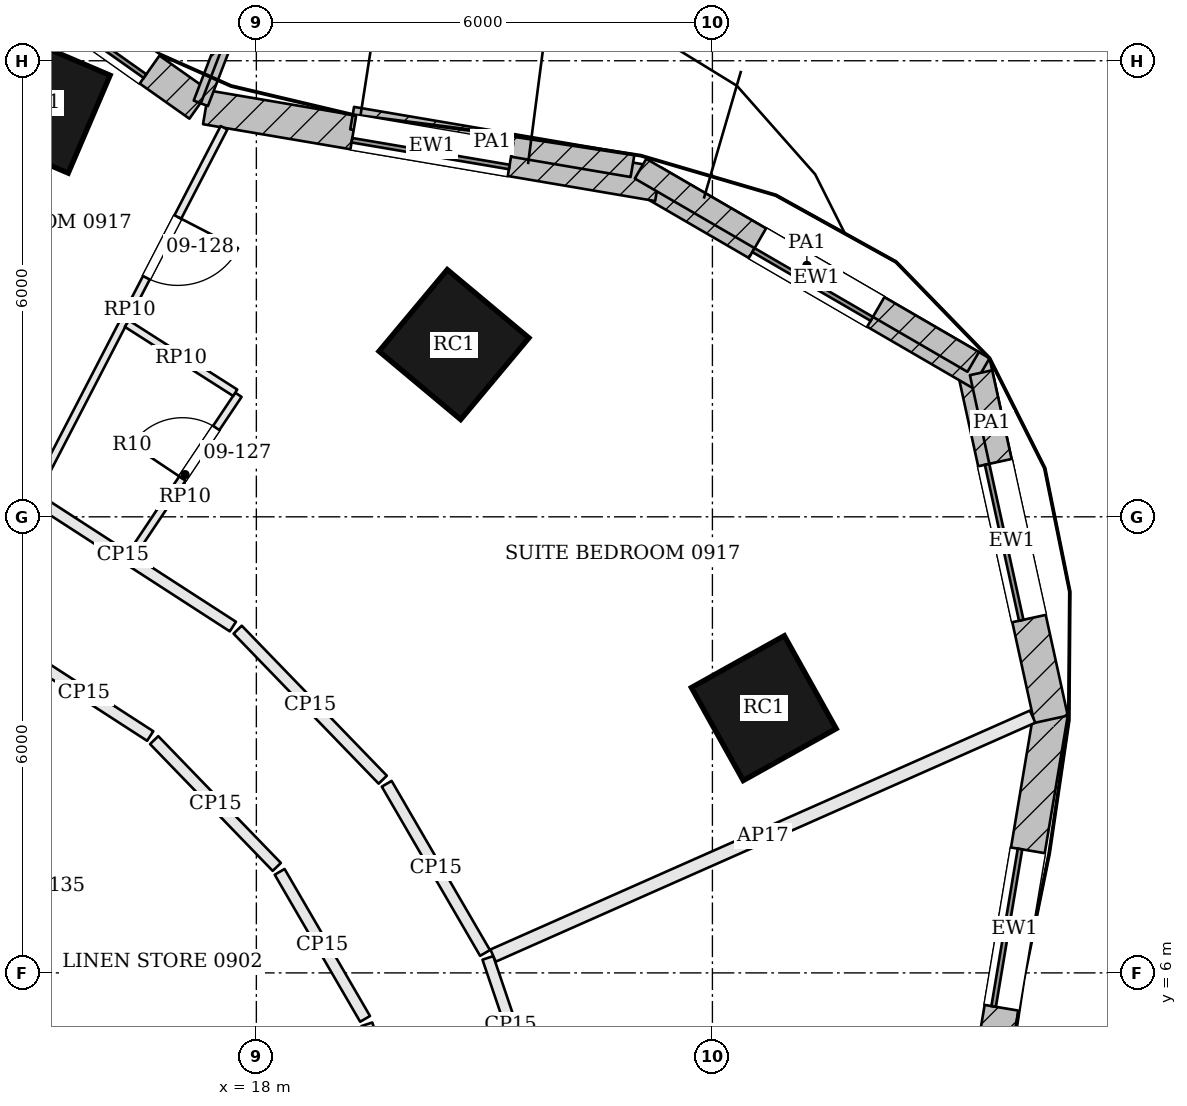
"""IFC4 building model, lengths in metres.
Left out: names, types, materials, properties, quantities, classifications, styles, units other than length and angle.
Written with IfcOpenShell. Run it as: python <this file> out.ifc"""

import sys

from ifc_helpers import new_model, si_unit, direction, frame, frame_2d, origin, origin_2d, place, context, subcontext, project, spatial, rectangle, extrude, element, fill, save


model = new_model("IFC4")
c1 = context("Model", 3, precision=1e-05, world=origin(), true_north=direction((0.0, 1.0)))
c2 = subcontext(c1, "Body", "Model", "MODEL_VIEW")
j1 = project(units=[si_unit("LENGTHUNIT", "METRE"), si_unit("PLANEANGLEUNIT", "RADIAN")], contexts=[c1])
p1 = place(None, origin())
s1 = spatial("IfcSite", under=j1, at=p1, CompositionType="ELEMENT")
p2 = place(p1, origin())
s2 = spatial("IfcBuilding", under=s1, at=p2, CompositionType="ELEMENT")
p3 = place(p2, frame((0.0, 0.0, 48.3)))
s3 = spatial("IfcBuildingStorey", under=s2, at=p3, CompositionType="ELEMENT", Elevation=48.3)
for number, where, z_axis, x_axis in (
    (1, (24.676, 9.483, 0.0), (0.0, 0.0, 1.0), (-0.487, 0.873, 0.0)),
    (2, (20.6, 14.266, 0.0), (0.0, 0.0, 1.0), (-0.767, 0.641, 0.0)),
    (3, (15.157, 17.441, 0.0), (0.0, 0.0, 1.0), (-0.919, 0.394, 0.0)),
):
    element("IfcColumn", number, at=place(p3, frame(where, z_axis=z_axis, x_axis=x_axis)), inside=s3, PredefinedType="COLUMN", context=c2, shape_type="SweptSolid", body=[
        extrude(rectangle(XDim=1.4, YDim=1.4, at=origin_2d()), origin(), (0.0, 0.0, 1.0), 3.6),
    ])
p4 = place(p3, frame((27.5, 3.732, 0.0), z_axis=(0.0, 0.0, 1.0), x_axis=(0.165174419367, 0.986264371853, 0.0)))
e4 = element("IfcWall", 4, at=p4, inside=s3, PredefinedType="SOLIDWALL", context=c2, shape_type="SweptSolid", body=[
    extrude(rectangle(XDim=5.769, YDim=0.45, at=frame_2d((2.885, 0.0))), origin(), (0.0, 0.0, 1.0), 3.4),
])
p5 = place(p4, frame((1.834, 0.0, 0.9)))
e5 = element("IfcOpeningElement", 5, at=p5, cuts=e4, PredefinedType="OPENING", context=c2, shape_type="SweptSolid", body=[
    extrude(rectangle(XDim=2.1, YDim=2.0, at=frame_2d((1.05, 1.0))), frame((0.0, 0.235, 0.0), z_axis=(0.0, -1.0, 0.0), x_axis=(1.0, 0.0, 0.0)), (0.0, 0.0, 1.0), 0.47),
])
p6 = place(p3, frame((28.456, 9.337, 0.0), z_axis=(0.0, 0.0, 1.0), x_axis=(-0.213878425795, 0.976860286315, 0.0)))
e6 = element("IfcWall", 6, at=p6, inside=s3, PredefinedType="SOLIDWALL", context=c2, shape_type="SweptSolid", body=[
    extrude(rectangle(XDim=4.812, YDim=0.45, at=frame_2d((2.406, 0.0))), origin(), (0.0, 0.0, 1.0), 3.4),
])
p7 = place(p6, frame((1.356, 0.0, 0.9)))
e7 = element("IfcOpeningElement", 7, at=p7, cuts=e6, PredefinedType="OPENING", context=c2, shape_type="SweptSolid", body=[
    extrude(rectangle(XDim=2.1, YDim=2.0, at=frame_2d((1.05, 1.0))), frame((0.0, 0.235, 0.0), z_axis=(0.0, -1.0, 0.0), x_axis=(1.0, 0.0, 0.0)), (0.0, 0.0, 1.0), 0.47),
])
p8 = place(p3, frame((27.533, 13.891, 0.0), z_axis=(0.0, 0.0, 1.0), x_axis=(-0.864657614938, 0.502361631625, 0.0)))
e8 = element("IfcWall", 8, at=p8, inside=s3, PredefinedType="SOLIDWALL", context=c2, shape_type="SweptSolid", body=[
    extrude(rectangle(XDim=5.001, YDim=0.45, at=frame_2d((2.5, 0.0))), origin(), (0.0, 0.0, 1.0), 3.4),
])
p9 = place(p8, frame((1.6, 0.0, 0.9)))
e9 = element("IfcOpeningElement", 9, at=p9, cuts=e8, PredefinedType="OPENING", context=c2, shape_type="SweptSolid", body=[
    extrude(rectangle(XDim=1.8, YDim=2.0, at=frame_2d((0.9, 1.0))), frame((0.0, 0.235, 0.0), z_axis=(0.0, -1.0, 0.0), x_axis=(1.0, 0.0, 0.0)), (0.0, 0.0, 1.0), 0.47),
])
p10 = place(p3, frame((23.284, 16.376, 0.0), z_axis=(0.0, 0.0, 1.0), x_axis=(-0.985861729428, 0.167560885797, 0.0)))
e10 = element("IfcWall", 10, at=p10, inside=s3, PredefinedType="SOLIDWALL", context=c2, shape_type="SweptSolid", body=[
    extrude(rectangle(XDim=6.033, YDim=0.45, at=frame_2d((3.017, 0.0))), origin(), (0.0, 0.0, 1.0), 3.4),
])
p11 = place(p10, frame((1.967, 0.0, 0.9)))
e11 = element("IfcOpeningElement", 11, at=p11, cuts=e10, PredefinedType="OPENING", context=c2, shape_type="SweptSolid", body=[
    extrude(rectangle(XDim=2.1, YDim=2.0, at=frame_2d((1.05, 1.0))), frame((0.0, 0.235, 0.0), z_axis=(0.0, -1.0, 0.0), x_axis=(1.0, 0.0, 0.0)), (0.0, 0.0, 1.0), 0.47),
])
p12 = place(p3, frame((17.249, 17.422, 0.0), z_axis=(0.0, 0.0, 1.0), x_axis=(-0.816589291225, 0.577219134694, 0.0)))
e12 = element("IfcWall", 12, at=p12, inside=s3, PredefinedType="SOLIDWALL", context=c2, shape_type="SweptSolid", body=[
    extrude(rectangle(XDim=3.701, YDim=0.45, at=frame_2d((1.851, 0.0))), origin(), (0.0, 0.0, 1.0), 3.4),
])
p13 = place(p12, frame((0.801, 0.0, 0.9)))
e13 = element("IfcOpeningElement", 13, at=p13, cuts=e12, PredefinedType="OPENING", context=c2, shape_type="SweptSolid", body=[
    extrude(rectangle(XDim=2.1, YDim=2.0, at=frame_2d((1.05, 1.0))), frame((0.0, 0.235, 0.0), z_axis=(0.0, -1.0, 0.0), x_axis=(1.0, 0.0, 0.0)), (0.0, 0.0, 1.0), 0.47),
])
p14 = place(p3, frame((17.269, 17.44, 0.0), z_axis=(0.0, 0.0, 1.0), x_axis=(0.359381039836, 0.933190906624, 0.0)))
e14 = element("IfcWall", 14, at=p14, inside=s3, PredefinedType="SOLIDWALL", context=c2, shape_type="SweptSolid", body=[
    extrude(rectangle(XDim=1.75, YDim=0.2, at=frame_2d((0.875, 0.0))), origin(), (0.0, 0.0, 1.0), 3.4),
])
p15 = place(p3, frame((27.823, 12.577, 3.6), z_axis=(0.0, 0.0, 1.0), x_axis=(-0.213826357694, 0.976871684898, 0.0)))
e15 = element("IfcWall", 15, at=p15, inside=s3, PredefinedType="PARAPET", context=c2, shape_type="SweptSolid", body=[
    extrude(rectangle(XDim=1.35, YDim=0.3, at=frame_2d((0.675, 0.0))), origin(), (0.0, 0.0, 1.0), 1.1),
])
p16 = place(p3, frame((27.431, 14.038, 3.6), z_axis=(0.0, 0.0, 1.0), x_axis=(-0.864664590165, 0.502349625773, 0.0)))
e16 = element("IfcWall", 16, at=p16, inside=s3, PredefinedType="PARAPET", context=c2, shape_type="SweptSolid", body=[
    extrude(rectangle(XDim=5.061, YDim=0.3, at=frame_2d((2.531, 0.0))), origin(), (0.0, 0.0, 1.0), 1.1),
])
p17 = place(p3, frame((22.949, 16.618, 3.6), z_axis=(0.0, 0.0, 1.0), x_axis=(-0.985859727788, 0.167572662229, 0.0)))
e17 = element("IfcWall", 17, at=p17, inside=s3, PredefinedType="PARAPET", context=c2, shape_type="SweptSolid", body=[
    extrude(rectangle(XDim=3.741, YDim=0.3, at=frame_2d((1.871, 0.0))), origin(), (0.0, 0.0, 1.0), 1.1),
])
p18 = place(p3, frame((21.644, 4.43, 0.0), z_axis=(0.0, 0.0, 1.0), x_axis=(-0.320738869387, 0.9471676608, 0.0)))
e18 = element("IfcWall", 18, at=p18, inside=s3, PredefinedType="PARTITIONING", context=c2, shape_type="SweptSolid", body=[
    extrude(rectangle(XDim=1.866, YDim=0.15, at=frame_2d((0.933, 0.0))), origin(), (0.0, 0.0, 1.0), 2.68),
])
p19 = place(p3, frame((28.213, 9.371, 0.0), z_axis=(0.0, 0.0, 1.0), x_axis=(-0.914345064768, -0.404935923986, 0.0)))
e19 = element("IfcWall", 19, at=p19, inside=s3, PredefinedType="PARTITIONING", context=c2, shape_type="SweptSolid", body=[
    extrude(rectangle(XDim=7.763, YDim=0.175, at=frame_2d((3.882, 0.0))), origin(), (0.0, 0.0, 1.0), 2.68),
])
p20 = place(p3, frame((21.008, 6.262, 0.0), z_axis=(0.0, 0.0, 1.0), x_axis=(-0.502366583903, 0.864654737671, 0.0)))
e20 = element("IfcWall", 20, at=p20, inside=s3, PredefinedType="PARTITIONING", context=c2, shape_type="SweptSolid", body=[
    extrude(rectangle(XDim=2.574, YDim=0.15, at=frame_2d((1.287, 0.0))), origin(), (0.0, 0.0, 1.0), 2.68),
])
p21 = place(p3, frame((19.663, 8.542, 0.0), z_axis=(0.0, 0.0, 1.0), x_axis=(-0.695225869021, 0.718791340407, 0.0)))
e21 = element("IfcWall", 21, at=p21, inside=s3, PredefinedType="PARTITIONING", context=c2, shape_type="SweptSolid", body=[
    extrude(rectangle(XDim=2.745, YDim=0.15, at=frame_2d((1.373, 0.0))), origin(), (0.0, 0.0, 1.0), 2.68),
])
p22 = place(p3, frame((17.691, 10.556, 0.0), z_axis=(0.0, 0.0, 1.0), x_axis=(-0.839564450265, 0.54326009779, 0.0)))
e22 = element("IfcWall", 22, at=p22, inside=s3, PredefinedType="PARTITIONING", context=c2, shape_type="SweptSolid", body=[
    extrude(rectangle(XDim=3.443, YDim=0.15, at=frame_2d((1.722, 0.0))), origin(), (0.0, 0.0, 1.0), 2.68),
])
p23 = place(p3, frame((14.863, 10.242, 0.0), z_axis=(0.0, 0.0, 1.0), x_axis=(0.839563837869, -0.543261044198, 0.0)))
e23 = element("IfcWall", 23, at=p23, inside=s3, PredefinedType="PARTITIONING", context=c2, shape_type="SweptSolid", body=[
    extrude(rectangle(XDim=2.073, YDim=0.15, at=frame_2d((1.037, 0.0))), origin(), (0.0, 0.0, 1.0), 2.68),
])
p24 = place(p3, frame((16.656, 9.062, 0.0), z_axis=(0.0, 0.0, 1.0), x_axis=(0.695225115827, -0.718792068906, 0.0)))
e24 = element("IfcWall", 24, at=p24, inside=s3, PredefinedType="PARTITIONING", context=c2, shape_type="SweptSolid", body=[
    extrude(rectangle(XDim=2.321, YDim=0.15, at=frame_2d((1.16, 0.0))), origin(), (0.0, 0.0, 1.0), 2.68),
])
p25 = place(p3, frame((18.306, 7.329, 0.0), z_axis=(0.0, 0.0, 1.0), x_axis=(0.502425081691, -0.864620747662, 0.0)))
e25 = element("IfcWall", 25, at=p25, inside=s3, PredefinedType="PARTITIONING", context=c2, shape_type="SweptSolid", body=[
    extrude(rectangle(XDim=2.237, YDim=0.15, at=frame_2d((1.119, 0.0))), origin(), (0.0, 0.0, 1.0), 2.68),
])
p26 = place(p3, frame((19.454, 5.324, 0.0), z_axis=(0.0, 0.0, 1.0), x_axis=(0.313632756375, -0.949544361327, 0.0)))
e26 = element("IfcWall", 26, at=p26, inside=s3, PredefinedType="PARTITIONING", context=c2, shape_type="SweptSolid", body=[
    extrude(rectangle(XDim=1.44, YDim=0.15, at=frame_2d((0.72, 0.0))), origin(), (0.0, 0.0, 1.0), 2.68),
])
p27 = place(p3, frame((17.575, 17.118, 0.0), z_axis=(0.0, 0.0, 1.0), x_axis=(-0.459763790059, -0.88804124755, 0.0)))
e27 = element("IfcWall", 27, at=p27, inside=s3, PredefinedType="PARTITIONING", context=c2, shape_type="SweptSolid", body=[
    extrude(rectangle(XDim=5.397, YDim=0.1, at=frame_2d((2.698, 0.0))), origin(), (0.0, 0.0, 1.0), 2.934),
])
p28 = place(p27, frame((1.322, 0.0, 0.0)))
e28 = element("IfcOpeningElement", 28, at=p28, cuts=e27, PredefinedType="OPENING", context=c2, shape_type="SweptSolid", body=[
    extrude(rectangle(XDim=0.9, YDim=2.4, at=frame_2d((0.45, 1.2))), frame((0.0, 0.06, 0.0), z_axis=(0.0, -1.0, 0.0), x_axis=(1.0, 0.0, 0.0)), (0.0, 0.0, 1.0), 0.12),
])
p29 = place(p3, frame((16.36, 11.507, 0.0), z_axis=(0.0, 0.0, 1.0), x_axis=(0.556060542822, 0.831141788576, 0.0)))
e29 = element("IfcWall", 29, at=p29, inside=s3, PredefinedType="PARTITIONING", context=c2, shape_type="SweptSolid", body=[
    extrude(rectangle(XDim=2.525, YDim=0.1, at=frame_2d((1.262, 0.0))), origin(), (0.0, 0.0, 1.0), 2.934),
])
p30 = place(p29, frame((1.2, 0.0, 0.0)))
e30 = element("IfcOpeningElement", 30, at=p30, cuts=e29, PredefinedType="OPENING", context=c2, shape_type="SweptSolid", body=[
    extrude(rectangle(XDim=0.8, YDim=2.1, at=frame_2d((0.4, 1.05))), frame((0.0, 0.06, 0.0), z_axis=(0.0, -1.0, 0.0), x_axis=(1.0, 0.0, 0.0)), (0.0, 0.0, 1.0), 0.12),
])
p31 = place(p3, frame((17.722, 13.632, 0.0), z_axis=(0.0, 0.0, 1.0), x_axis=(-0.843078245163, 0.537790918977, 0.0)))
e31 = element("IfcWall", 31, at=p31, inside=s3, PredefinedType="PARTITIONING", context=c2, shape_type="SweptSolid", body=[
    extrude(rectangle(XDim=1.691, YDim=0.1, at=frame_2d((0.845, 0.0))), origin(), (0.0, 0.0, 1.0), 2.934),
])
p32 = place(p5, origin())
e32 = element("IfcWindow", 32, at=p32, inside=s3, PartitioningType="SINGLE_PANEL", PredefinedType="WINDOW", context=c2, shape_type="SweptSolid", body=[
    extrude(rectangle(XDim=2.1, YDim=2.0, at=frame_2d((1.05, 1.0))), frame((0.0, 0.135, 0.0), z_axis=(0.0, -1.0, 0.0), x_axis=(1.0, 0.0, 0.0)), (0.0, 0.0, 1.0), 0.06),
])
fill(e5, e32)
p33 = place(p7, origin())
e33 = element("IfcWindow", 33, at=p33, inside=s3, PartitioningType="SINGLE_PANEL", PredefinedType="WINDOW", context=c2, shape_type="SweptSolid", body=[
    extrude(rectangle(XDim=2.1, YDim=2.0, at=frame_2d((1.05, 1.0))), frame((0.0, 0.135, 0.0), z_axis=(0.0, -1.0, 0.0), x_axis=(1.0, 0.0, 0.0)), (0.0, 0.0, 1.0), 0.06),
])
fill(e7, e33)
p34 = place(p9, origin())
e34 = element("IfcWindow", 34, at=p34, inside=s3, PartitioningType="SINGLE_PANEL", PredefinedType="WINDOW", context=c2, shape_type="SweptSolid", body=[
    extrude(rectangle(XDim=1.8, YDim=2.0, at=frame_2d((0.9, 1.0))), frame((0.0, 0.135, 0.0), z_axis=(0.0, -1.0, 0.0), x_axis=(1.0, 0.0, 0.0)), (0.0, 0.0, 1.0), 0.06),
])
fill(e9, e34)
p35 = place(p11, origin())
e35 = element("IfcWindow", 35, at=p35, inside=s3, PartitioningType="SINGLE_PANEL", PredefinedType="WINDOW", context=c2, shape_type="SweptSolid", body=[
    extrude(rectangle(XDim=2.1, YDim=2.0, at=frame_2d((1.05, 1.0))), frame((0.0, 0.135, 0.0), z_axis=(0.0, -1.0, 0.0), x_axis=(1.0, 0.0, 0.0)), (0.0, 0.0, 1.0), 0.06),
])
fill(e11, e35)
p36 = place(p13, origin())
e36 = element("IfcWindow", 36, at=p36, inside=s3, PartitioningType="SINGLE_PANEL", PredefinedType="WINDOW", context=c2, shape_type="SweptSolid", body=[
    extrude(rectangle(XDim=2.1, YDim=2.0, at=frame_2d((1.05, 1.0))), frame((0.0, 0.135, 0.0), z_axis=(0.0, -1.0, 0.0), x_axis=(1.0, 0.0, 0.0)), (0.0, 0.0, 1.0), 0.06),
])
fill(e13, e36)
p37 = place(p30, origin())
e37 = element("IfcDoor", 37, at=p37, inside=s3, OperationType="SINGLE_SWING_LEFT", PredefinedType="DOOR", context=c2, shape_type="SweptSolid", body=[
    extrude(rectangle(XDim=0.8, YDim=2.1, at=frame_2d((0.4, 1.05))), frame((0.0, 0.025, 0.0), z_axis=(0.0, -1.0, 0.0), x_axis=(1.0, 0.0, 0.0)), (0.0, 0.0, 1.0), 0.05),
])
fill(e30, e37)
p38 = place(p28, origin())
e38 = element("IfcDoor", 38, at=p38, inside=s3, OperationType="SINGLE_SWING_LEFT", PredefinedType="DOOR", context=c2, shape_type="SweptSolid", body=[
    extrude(rectangle(XDim=0.9, YDim=2.4, at=frame_2d((0.45, 1.2))), frame((0.0, 0.025, 0.0), z_axis=(0.0, -1.0, 0.0), x_axis=(1.0, 0.0, 0.0)), (0.0, 0.0, 1.0), 0.05),
])
fill(e28, e38)
save(model, sys.argv[1])
